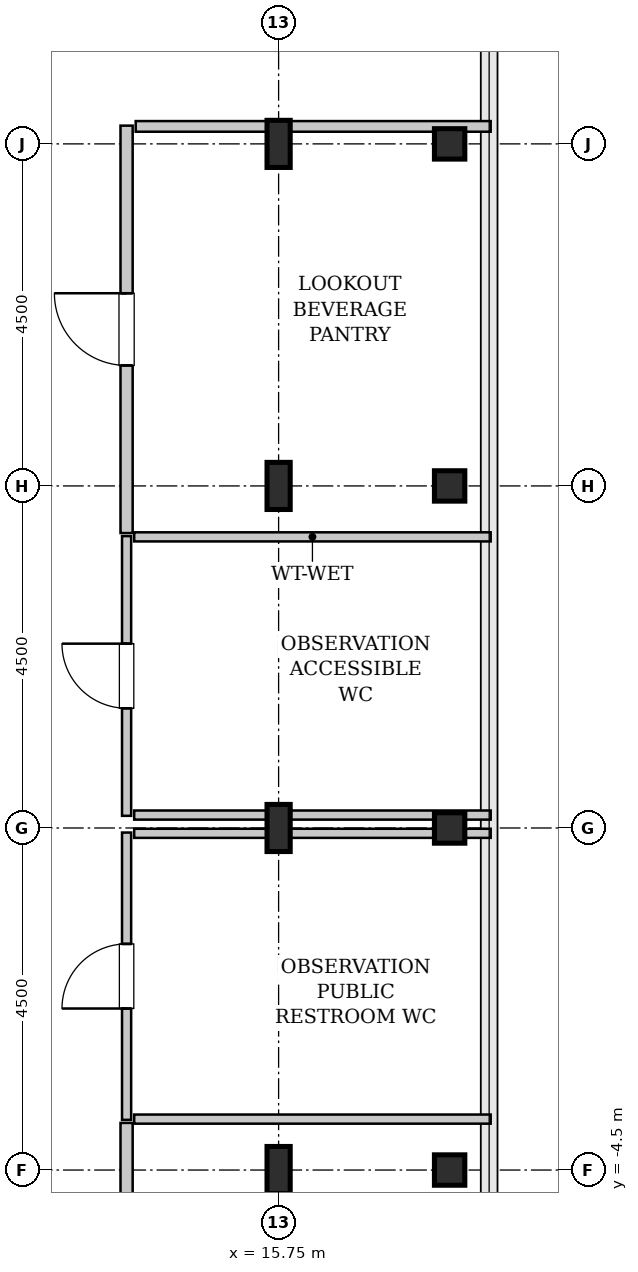
"""IFC4 building model, lengths in metres.
Left out: names, types, materials, properties, quantities, classifications, styles, units other than length and angle.
Written with IfcOpenShell. Run it as: python <this file> out.ifc"""

import sys

from ifc_helpers import new_model, si_unit, direction, frame, frame_2d, origin, origin_2d, place, context, subcontext, project, spatial, rectangle, hollow_rectangle, i_section, extrude, source, transform, mapped, element, fill, save


model = new_model("IFC4")
c1 = context("Model", 3, precision=1e-05, world=origin(), true_north=direction((0.0, 1.0)))
c2 = subcontext(c1, "Body", "Model", "MODEL_VIEW")
j1 = project(units=[si_unit("LENGTHUNIT", "METRE"), si_unit("PLANEANGLEUNIT", "RADIAN")], contexts=[c1])
p1 = place(None, origin())
s1 = spatial("IfcSite", under=j1, at=p1, CompositionType="ELEMENT")
p2 = place(p1, origin())
s2 = spatial("IfcBuilding", under=s1, at=p2, CompositionType="ELEMENT")
p3 = place(p2, frame((0.0, 0.0, 349.0)))
s3 = spatial("IfcBuildingStorey", under=s2, at=p3, CompositionType="ELEMENT", Elevation=349.0)
m1 = source(origin(), c2, "Body", "SweptSolid", [
    extrude(i_section(OverallWidth=0.305, OverallDepth=0.62, WebThickness=0.021, FlangeThickness=0.04, FilletRadius=0.027, at=origin_2d()), origin(), (0.0, 0.0, 1.0), 4.8),
])
for number, where, z_axis, x_axis in (
    (1, (15.75, -4.5, 0.0), (0.0, 0.0, 1.0), (1.0, 0.0, 0.0)),
    (2, (15.75, 0.0, 0.0), (0.0, 0.0, 1.0), (1.0, 0.0, 0.0)),
    (3, (15.75, 4.5, 0.0), (0.0, 0.0, 1.0), (1.0, 0.0, 0.0)),
    (4, (15.75, 9.0, 0.0), (0.0, 0.0, 1.0), (1.0, 0.0, 0.0)),
):
    element("IfcColumn", number, at=place(p3, frame(where, z_axis=z_axis, x_axis=x_axis)), inside=s3, PredefinedType="COLUMN", context=c2, shape_type="MappedRepresentation", body=[
        mapped(m1, transform((0.0, 0.0, 0.0), x_axis=(1.0, 0.0, 0.0), y_axis=(0.0, 1.0, 0.0), z_axis=(0.0, 0.0, 1.0), scale=1.0)),
    ])
m2 = source(origin(), c2, "Body", "SweptSolid", [
    extrude(hollow_rectangle(XDim=0.4, YDim=0.4, WallThickness=0.02, InnerFilletRadius=0.02, OuterFilletRadius=0.04, at=origin_2d()), origin(), (0.0, 0.0, 1.0), 4.8),
])
for number, where, z_axis, x_axis in (
    (5, (18.0, -4.5, 0.0), (0.0, 0.0, 1.0), (1.0, 0.0, 0.0)),
    (6, (18.0, 0.0, 0.0), (0.0, 0.0, 1.0), (1.0, 0.0, 0.0)),
    (7, (18.0, 4.5, 0.0), (0.0, 0.0, 1.0), (1.0, 0.0, 0.0)),
    (8, (18.0, 9.0, 0.0), (0.0, 0.0, 1.0), (1.0, 0.0, 0.0)),
):
    element("IfcColumn", number, at=place(p3, frame(where, z_axis=z_axis, x_axis=x_axis)), inside=s3, PredefinedType="COLUMN", context=c2, shape_type="MappedRepresentation", body=[
        mapped(m2, transform((0.0, 0.0, 0.0), x_axis=(1.0, 0.0, 0.0), y_axis=(0.0, 1.0, 0.0), z_axis=(0.0, 0.0, 1.0), scale=1.0)),
    ])
m3 = source(origin(), c2, "Body", "SweptSolid", [
    extrude(rectangle(XDim=3.68, YDim=0.12, at=frame_2d((1.84, 0.0))), origin(), (0.0, 0.0, 1.0), 4.485),
])
p4 = place(p3, frame((13.75, 0.16, 0.0), z_axis=(0.0, 0.0, 1.0), x_axis=(0.0, 1.0, 0.0)))
e9 = element("IfcWall", 9, at=p4, inside=s3, PredefinedType="PLUMBINGWALL", context=c2, shape_type="MappedRepresentation", body=[
    mapped(m3, transform((0.0, 0.0, 0.0), x_axis=(1.0, 0.0, 0.0), y_axis=(0.0, 1.0, 0.0), z_axis=(0.0, 0.0, 1.0), scale=1.0)),
])
p5 = place(p4, frame((1.415, 0.0, 0.0)))
e10 = element("IfcOpeningElement", 10, at=p5, cuts=e9, PredefinedType="OPENING", context=c2, shape_type="SweptSolid", body=[
    extrude(rectangle(XDim=0.85, YDim=2.1, at=frame_2d((0.425, 1.05))), frame((0.0, 0.07, 0.0), z_axis=(0.0, -1.0, 0.0), x_axis=(1.0, 0.0, 0.0)), (0.0, 0.0, 1.0), 0.14),
])
m4 = source(origin(), c2, "Body", "SweptSolid", [
    extrude(rectangle(XDim=4.69, YDim=0.12, at=frame_2d((2.345, 0.0))), origin(), (0.0, 0.0, 1.0), 4.485),
])
p6 = place(p3, frame((13.85, 3.83, 0.0), z_axis=(0.0, 0.0, 1.0), x_axis=(1.0, 0.0, 0.0)))
e11 = element("IfcWall", 11, at=p6, inside=s3, PredefinedType="PLUMBINGWALL", context=c2, shape_type="MappedRepresentation", body=[
    mapped(m4, transform((0.0, 0.0, 0.0), x_axis=(1.0, 0.0, 0.0), y_axis=(0.0, 1.0, 0.0), z_axis=(0.0, 0.0, 1.0), scale=1.0)),
])
m5 = source(origin(), c2, "Body", "SweptSolid", [
    extrude(rectangle(XDim=4.69, YDim=0.12, at=frame_2d((2.345, 0.0))), origin(), (0.0, 0.0, 1.0), 3.925),
])
p7 = place(p3, frame((13.85, 0.17, 0.0), z_axis=(0.0, 0.0, 1.0), x_axis=(1.0, 0.0, 0.0)))
e12 = element("IfcWall", 12, at=p7, inside=s3, PredefinedType="PLUMBINGWALL", context=c2, shape_type="MappedRepresentation", body=[
    mapped(m5, transform((0.0, 0.0, 0.0), x_axis=(1.0, 0.0, 0.0), y_axis=(0.0, 1.0, 0.0), z_axis=(0.0, 0.0, 1.0), scale=1.0)),
])
m6 = source(origin(), c2, "Body", "SweptSolid", [
    extrude(rectangle(XDim=3.78, YDim=0.12, at=frame_2d((1.89, 0.0))), origin(), (0.0, 0.0, 1.0), 4.485),
])
p8 = place(p3, frame((13.75, -3.84, 0.0), z_axis=(0.0, 0.0, 1.0), x_axis=(0.0, 1.0, 0.0)))
e13 = element("IfcWall", 13, at=p8, inside=s3, PredefinedType="PLUMBINGWALL", context=c2, shape_type="MappedRepresentation", body=[
    mapped(m6, transform((0.0, 0.0, 0.0), x_axis=(1.0, 0.0, 0.0), y_axis=(0.0, 1.0, 0.0), z_axis=(0.0, 0.0, 1.0), scale=1.0)),
])
p9 = place(p8, frame((1.465, 0.0, 0.0)))
e14 = element("IfcOpeningElement", 14, at=p9, cuts=e13, PredefinedType="OPENING", context=c2, shape_type="SweptSolid", body=[
    extrude(rectangle(XDim=0.85, YDim=2.1, at=frame_2d((0.425, 1.05))), frame((0.0, 0.07, 0.0), z_axis=(0.0, -1.0, 0.0), x_axis=(1.0, 0.0, 0.0)), (0.0, 0.0, 1.0), 0.14),
])
p10 = place(p3, frame((13.85, -0.07, 0.0), z_axis=(0.0, 0.0, 1.0), x_axis=(1.0, 0.0, 0.0)))
e15 = element("IfcWall", 15, at=p10, inside=s3, PredefinedType="PLUMBINGWALL", context=c2, shape_type="MappedRepresentation", body=[
    mapped(m5, transform((0.0, 0.0, 0.0), x_axis=(1.0, 0.0, 0.0), y_axis=(0.0, 1.0, 0.0), z_axis=(0.0, 0.0, 1.0), scale=1.0)),
])
p11 = place(p3, frame((13.85, -3.83, 0.0), z_axis=(0.0, 0.0, 1.0), x_axis=(1.0, 0.0, 0.0)))
e16 = element("IfcWall", 16, at=p11, inside=s3, PredefinedType="PLUMBINGWALL", context=c2, shape_type="MappedRepresentation", body=[
    mapped(m4, transform((0.0, 0.0, 0.0), x_axis=(1.0, 0.0, 0.0), y_axis=(0.0, 1.0, 0.0), z_axis=(0.0, 0.0, 1.0), scale=1.0)),
])
m7 = source(origin(), c2, "Body", "SweptSolid", [
    extrude(rectangle(XDim=5.36, YDim=0.16, at=frame_2d((2.68, 0.0))), origin(), (0.0, 0.0, 1.0), 4.485),
])
p12 = place(p3, frame((13.75, 3.88, 0.0), z_axis=(0.0, 0.0, 1.0), x_axis=(0.0, 1.0, 0.0)))
e17 = element("IfcWall", 17, at=p12, inside=s3, PredefinedType="PARTITIONING", context=c2, shape_type="MappedRepresentation", body=[
    mapped(m7, transform((0.0, 0.0, 0.0), x_axis=(1.0, 0.0, 0.0), y_axis=(0.0, 1.0, 0.0), z_axis=(0.0, 0.0, 1.0), scale=1.0)),
])
p13 = place(p12, frame((2.205, 0.0, 0.0)))
e18 = element("IfcOpeningElement", 18, at=p13, cuts=e17, PredefinedType="OPENING", context=c2, shape_type="SweptSolid", body=[
    extrude(rectangle(XDim=0.95, YDim=2.1, at=frame_2d((0.475, 1.05))), frame((0.0, 0.09, 0.0), z_axis=(0.0, -1.0, 0.0), x_axis=(1.0, 0.0, 0.0)), (0.0, 0.0, 1.0), 0.18),
])
m8 = source(origin(), c2, "Body", "SweptSolid", [
    extrude(rectangle(XDim=4.67, YDim=0.14, at=frame_2d((2.335, 0.0))), origin(), (0.0, 0.0, 1.0), 3.925),
])
p14 = place(p3, frame((13.87, 9.23, 0.0), z_axis=(0.0, 0.0, 1.0), x_axis=(1.0, 0.0, 0.0)))
e19 = element("IfcWall", 19, at=p14, inside=s3, PredefinedType="PARTITIONING", context=c2, shape_type="MappedRepresentation", body=[
    mapped(m8, transform((0.0, 0.0, 0.0), x_axis=(1.0, 0.0, 0.0), y_axis=(0.0, 1.0, 0.0), z_axis=(0.0, 0.0, 1.0), scale=1.0)),
])
p15 = place(p3, frame((13.75, -9.24, 0.0), z_axis=(0.0, 0.0, 1.0), x_axis=(0.0, 1.0, 0.0)))
e20 = element("IfcWall", 20, at=p15, inside=s3, PredefinedType="PARTITIONING", context=c2, shape_type="MappedRepresentation", body=[
    mapped(m7, transform((0.0, 0.0, 0.0), x_axis=(1.0, 0.0, 0.0), y_axis=(0.0, 1.0, 0.0), z_axis=(0.0, 0.0, 1.0), scale=1.0)),
])
p16 = place(p15, frame((2.205, 0.0, 0.0)))
e21 = element("IfcOpeningElement", 21, at=p16, cuts=e20, PredefinedType="OPENING", context=c2, shape_type="SweptSolid", body=[
    extrude(rectangle(XDim=0.95, YDim=2.1, at=frame_2d((0.475, 1.05))), frame((0.0, 0.09, 0.0), z_axis=(0.0, -1.0, 0.0), x_axis=(1.0, 0.0, 0.0)), (0.0, 0.0, 1.0), 0.18),
])
m9 = source(origin(), c2, "Body", "SweptSolid", [
    extrude(rectangle(XDim=0.85, YDim=2.1, at=frame_2d((0.425, 1.05))), frame((0.0, 0.025, 0.0), z_axis=(0.0, -1.0, 0.0), x_axis=(1.0, 0.0, 0.0)), (0.0, 0.0, 1.0), 0.05),
])
p17 = place(p5, origin())
e22 = element("IfcDoor", 22, at=p17, inside=s3, OperationType="SINGLE_SWING_RIGHT", PredefinedType="DOOR", context=c2, shape_type="MappedRepresentation", body=[
    mapped(m9, transform((0.0, 0.0, 0.0), x_axis=(1.0, 0.0, 0.0), y_axis=(0.0, 1.0, 0.0), z_axis=(0.0, 0.0, 1.0), scale=1.0)),
])
fill(e10, e22)
p18 = place(p9, origin())
e23 = element("IfcDoor", 23, at=p18, inside=s3, OperationType="SINGLE_SWING_LEFT", PredefinedType="DOOR", context=c2, shape_type="MappedRepresentation", body=[
    mapped(m9, transform((0.0, 0.0, 0.0), x_axis=(1.0, 0.0, 0.0), y_axis=(0.0, 1.0, 0.0), z_axis=(0.0, 0.0, 1.0), scale=1.0)),
])
fill(e14, e23)
m10 = source(origin(), c2, "Body", "SweptSolid", [
    extrude(rectangle(XDim=0.95, YDim=2.1, at=frame_2d((0.475, 1.05))), frame((0.0, 0.025, 0.0), z_axis=(0.0, -1.0, 0.0), x_axis=(1.0, 0.0, 0.0)), (0.0, 0.0, 1.0), 0.05),
])
p19 = place(p13, origin())
e24 = element("IfcDoor", 24, at=p19, inside=s3, OperationType="SINGLE_SWING_RIGHT", PredefinedType="DOOR", context=c2, shape_type="MappedRepresentation", body=[
    mapped(m10, transform((0.0, 0.0, 0.0), x_axis=(1.0, 0.0, 0.0), y_axis=(0.0, 1.0, 0.0), z_axis=(0.0, 0.0, 1.0), scale=1.0)),
])
fill(e18, e24)
save(model, sys.argv[1])
